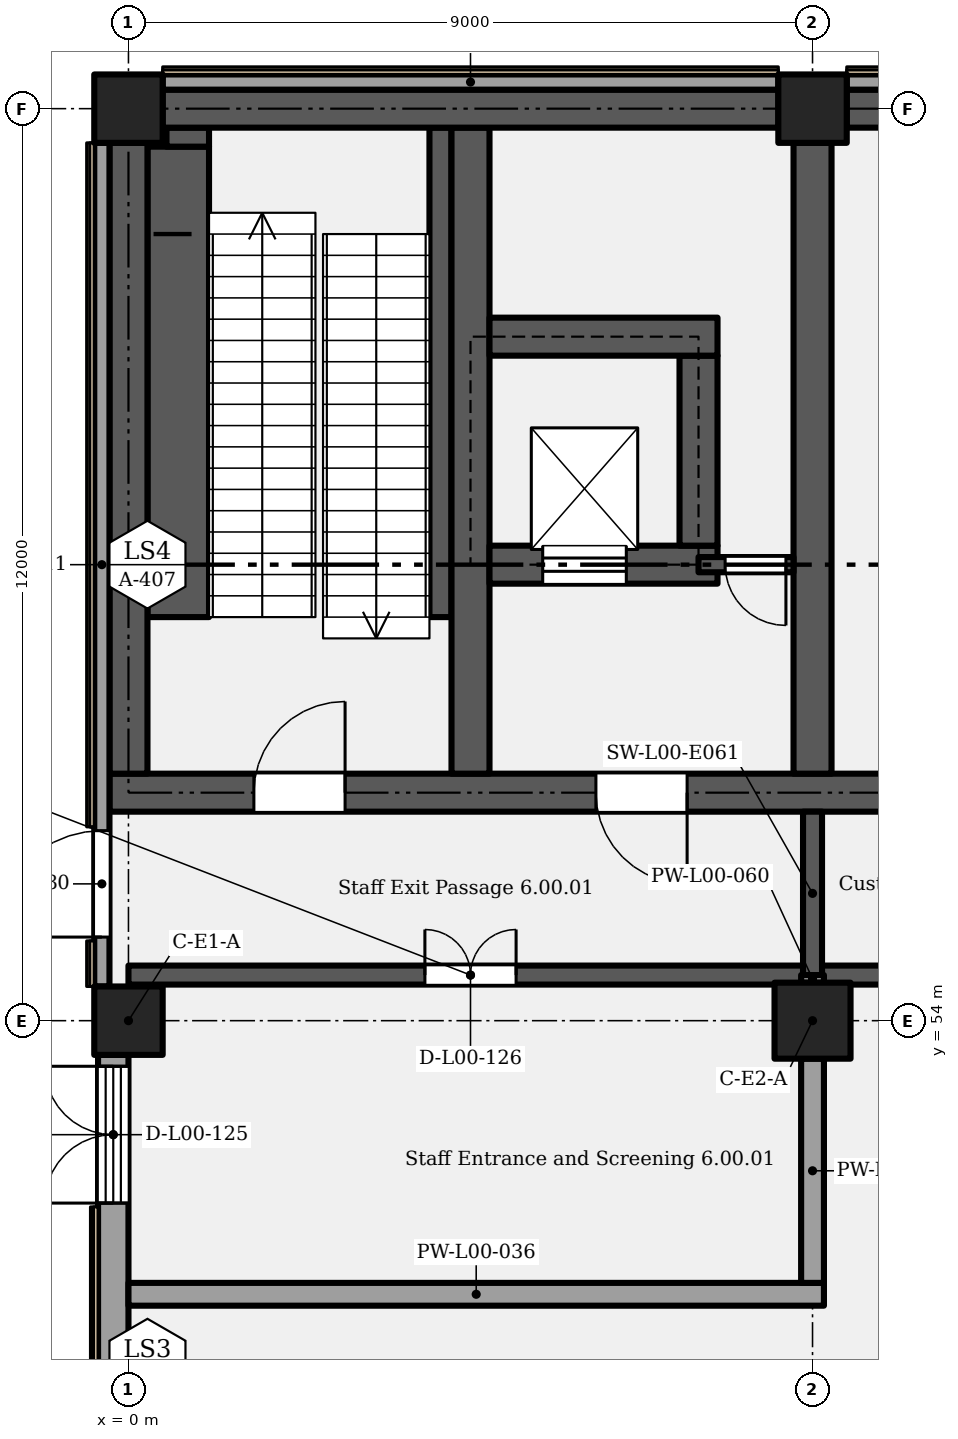
"""IFC4 building model, lengths in metres.
Left out: names, types, materials, properties, quantities, classifications, styles, units other than length and angle.
Written with IfcOpenShell. Run it as: python <this file> out.ifc"""

import sys

from ifc_helpers import new_model, si_unit, direction, frame, frame_2d, origin, origin_2d, place, context, subcontext, project, spatial, rectangle, extrude, element, fill, save


model = new_model("IFC4")
c1 = context("Model", 3, precision=1e-05, world=origin(), true_north=direction((0.0, 1.0)))
c2 = subcontext(c1, "Body", "Model", "MODEL_VIEW")
j1 = project(units=[si_unit("LENGTHUNIT", "METRE"), si_unit("PLANEANGLEUNIT", "RADIAN")], contexts=[c1])
p1 = place(None, origin())
s1 = spatial("IfcSite", under=j1, at=p1, CompositionType="ELEMENT")
p2 = place(p1, origin())
s2 = spatial("IfcBuilding", under=s1, at=p2, CompositionType="ELEMENT")
p3 = place(p2, origin())
s3 = spatial("IfcBuildingStorey", under=s2, at=p3, CompositionType="ELEMENT", Elevation=0.0)
p4 = place(p3, frame((0.0, 54.0, 0.0), z_axis=(0.0, 0.0, 1.0), x_axis=(1.0, 0.0, 0.0)))
e1 = element("IfcColumn", 1, at=p4, inside=s3, PredefinedType="COLUMN", context=c2, shape_type="SweptSolid", body=[
    extrude(rectangle(XDim=0.9, YDim=0.9, at=origin_2d()), origin(), (0.0, 0.0, 1.0), 6.6),
])
p5 = place(p3, frame((9.0, 54.0, 0.0), z_axis=(0.0, 0.0, 1.0), x_axis=(1.0, 0.0, 0.0)))
e2 = element("IfcColumn", 2, at=p5, inside=s3, PredefinedType="COLUMN", context=c2, shape_type="SweptSolid", body=[
    extrude(rectangle(XDim=1.0, YDim=1.0, at=origin_2d()), origin(), (0.0, 0.0, 1.0), 6.6),
])
for number, where, z_axis, x_axis in (
    (3, (0.0, 66.0, 0.0), (0.0, 0.0, 1.0), (1.0, 0.0, 0.0)),
    (4, (9.0, 66.0, 0.0), (0.0, 0.0, 1.0), (1.0, 0.0, 0.0)),
):
    element("IfcColumn", number, at=place(p3, frame(where, z_axis=z_axis, x_axis=x_axis)), inside=s3, PredefinedType="COLUMN", context=c2, shape_type="SweptSolid", body=[
        extrude(rectangle(XDim=0.9, YDim=0.9, at=origin_2d()), origin(), (0.0, 0.0, 1.0), 6.6),
    ])
p6 = place(p3, frame((-0.25, 57.0, 0.0), z_axis=(0.0, 0.0, 1.0), x_axis=(1.0, 0.0, 0.0)))
e5 = element("IfcWall", 5, at=p6, inside=s3, PredefinedType="SHEAR", context=c2, shape_type="SweptSolid", body=[
    extrude(rectangle(XDim=27.5, YDim=0.5, at=frame_2d((13.75, 0.0))), origin(), (0.0, 0.0, 1.0), 6.3),
])
p7 = place(p6, frame((1.9, 0.0, 0.0)))
e6 = element("IfcOpeningElement", 6, at=p7, cuts=e5, PredefinedType="OPENING", context=c2, shape_type="SweptSolid", body=[
    extrude(rectangle(XDim=1.2, YDim=2.1, at=frame_2d((0.6, 1.05))), frame((0.0, 0.26, 0.0), z_axis=(0.0, -1.0, 0.0), x_axis=(1.0, 0.0, 0.0)), (0.0, 0.0, 1.0), 0.52),
])
p8 = place(p6, frame((7.6, 0.0, 0.0), z_axis=(0.0, 0.0, 1.0), x_axis=(-1.0, 0.0, 0.0)))
e7 = element("IfcOpeningElement", 7, at=p8, cuts=e5, PredefinedType="OPENING", context=c2, shape_type="SweptSolid", body=[
    extrude(rectangle(XDim=1.2, YDim=2.1, at=frame_2d((0.6, 1.05))), frame((0.0, 0.26, 0.0), z_axis=(0.0, -1.0, 0.0), x_axis=(1.0, 0.0, 0.0)), (0.0, 0.0, 1.0), 0.52),
])
p9 = place(p6, frame((21.1, 0.0, 0.0), z_axis=(0.0, 0.0, 1.0), x_axis=(-1.0, 0.0, 0.0)))
e8 = element("IfcOpeningElement", 8, at=p9, cuts=e5, PredefinedType="OPENING", context=c2, shape_type="SweptSolid", body=[
    extrude(rectangle(XDim=1.2, YDim=2.1, at=frame_2d((0.6, 1.05))), frame((0.0, 0.26, 0.0), z_axis=(0.0, -1.0, 0.0), x_axis=(1.0, 0.0, 0.0)), (0.0, 0.0, 1.0), 0.52),
])
p10 = place(p6, frame((24.4, 0.0, 0.0)))
e9 = element("IfcOpeningElement", 9, at=p10, cuts=e5, PredefinedType="OPENING", context=c2, shape_type="SweptSolid", body=[
    extrude(rectangle(XDim=1.2, YDim=2.1, at=frame_2d((0.6, 1.05))), frame((0.0, 0.26, 0.0), z_axis=(0.0, -1.0, 0.0), x_axis=(1.0, 0.0, 0.0)), (0.0, 0.0, 1.0), 0.52),
])
p11 = place(p3, frame((0.0, 57.25, 0.0), z_axis=(0.0, 0.0, 1.0), x_axis=(0.0, 1.0, 0.0)))
e10 = element("IfcWall", 10, at=p11, inside=s3, PredefinedType="SHEAR", context=c2, shape_type="SweptSolid", body=[
    extrude(rectangle(XDim=8.3, YDim=0.5, at=frame_2d((4.15, 0.0))), origin(), (0.0, 0.0, 1.0), 6.3),
])
p12 = place(p3, frame((4.5, 57.25, 0.0), z_axis=(0.0, 0.0, 1.0), x_axis=(0.0, 1.0, 0.0)))
e11 = element("IfcWall", 11, at=p12, inside=s3, PredefinedType="SHEAR", context=c2, shape_type="SweptSolid", body=[
    extrude(rectangle(XDim=8.5, YDim=0.5, at=frame_2d((4.25, 0.0))), origin(), (0.0, 0.0, 1.0), 6.3),
])
p13 = place(p3, frame((9.0, 57.25, 0.0), z_axis=(0.0, 0.0, 1.0), x_axis=(0.0, 1.0, 0.0)))
e12 = element("IfcWall", 12, at=p13, inside=s3, PredefinedType="SHEAR", context=c2, shape_type="SweptSolid", body=[
    extrude(rectangle(XDim=8.3, YDim=0.5, at=frame_2d((4.15, 0.0))), origin(), (0.0, 0.0, 1.0), 6.3),
])
p14 = place(p3, frame((4.75, 60.0, 0.0), z_axis=(0.0, 0.0, 1.0), x_axis=(1.0, 0.0, 0.0)))
e13 = element("IfcWall", 13, at=p14, inside=s3, PredefinedType="SHEAR", context=c2, shape_type="SweptSolid", body=[
    extrude(rectangle(XDim=3.0, YDim=0.5, at=frame_2d((1.5, 0.0))), origin(), (0.0, 0.0, 1.0), 6.3),
])
p15 = place(p14, frame((0.7, 0.0, 0.0)))
e14 = element("IfcOpeningElement", 14, at=p15, cuts=e13, PredefinedType="OPENING", context=c2, shape_type="SweptSolid", body=[
    extrude(rectangle(XDim=1.1, YDim=2.1, at=frame_2d((0.55, 1.05))), frame((0.0, 0.26, 0.0), z_axis=(0.0, -1.0, 0.0), x_axis=(1.0, 0.0, 0.0)), (0.0, 0.0, 1.0), 0.52),
])
p16 = place(p3, frame((7.5, 60.25, 0.0), z_axis=(0.0, 0.0, 1.0), x_axis=(0.0, 1.0, 0.0)))
e15 = element("IfcWall", 15, at=p16, inside=s3, PredefinedType="SHEAR", context=c2, shape_type="SweptSolid", body=[
    extrude(rectangle(XDim=2.5, YDim=0.5, at=frame_2d((1.25, 0.0))), origin(), (0.0, 0.0, 1.0), 6.3),
])
p17 = place(p3, frame((4.75, 63.0, 0.0), z_axis=(0.0, 0.0, 1.0), x_axis=(1.0, 0.0, 0.0)))
e16 = element("IfcWall", 16, at=p17, inside=s3, PredefinedType="SHEAR", context=c2, shape_type="SweptSolid", body=[
    extrude(rectangle(XDim=3.0, YDim=0.5, at=frame_2d((1.5, 0.0))), origin(), (0.0, 0.0, 1.0), 6.3),
])
p18 = place(p3, frame((0.45, 66.0, 0.0), z_axis=(0.0, 0.0, 1.0), x_axis=(1.0, 0.0, 0.0)))
e17 = element("IfcWall", 17, at=p18, inside=s3, PredefinedType="SHEAR", context=c2, shape_type="SweptSolid", body=[
    extrude(rectangle(XDim=8.1, YDim=0.5, at=frame_2d((4.05, 0.0))), origin(), (0.0, 0.0, 1.0), 6.3),
])
p19 = place(p3, frame((9.45, 66.0, 0.0), z_axis=(0.0, 0.0, 1.0), x_axis=(1.0, 0.0, 0.0)))
e18 = element("IfcWall", 18, at=p19, inside=s3, PredefinedType="SHEAR", context=c2, shape_type="SweptSolid", body=[
    extrude(rectangle(XDim=8.1, YDim=0.5, at=frame_2d((4.05, 0.0))), origin(), (0.0, 0.0, 1.0), 6.3),
])
p20 = place(p19, frame((3.35, 0.0, 0.0)))
e19 = element("IfcOpeningElement", 19, at=p20, cuts=e18, PredefinedType="OPENING", context=c2, shape_type="SweptSolid", body=[
    extrude(rectangle(XDim=1.4, YDim=2.1, at=frame_2d((0.7, 1.05))), frame((0.0, 0.26, 0.0), z_axis=(0.0, -1.0, 0.0), x_axis=(1.0, 0.0, 0.0)), (0.0, 0.0, 1.0), 0.52),
])
p21 = place(p3, frame((0.45, 66.35, 0.0), z_axis=(0.0, 0.0, 1.0), x_axis=(1.0, 0.0, 0.0)))
e20 = element("IfcWall", 20, at=p21, inside=s3, PredefinedType="SOLIDWALL", context=c2, shape_type="SweptSolid", body=[
    extrude(rectangle(XDim=8.1, YDim=0.2, at=frame_2d((4.05, 0.0))), origin(), (0.0, 0.0, 1.0), 6.3),
])
p22 = place(p3, frame((9.45, 66.35, 0.0), z_axis=(0.0, 0.0, 1.0), x_axis=(1.0, 0.0, 0.0)))
e21 = element("IfcWall", 21, at=p22, inside=s3, PredefinedType="SOLIDWALL", context=c2, shape_type="SweptSolid", body=[
    extrude(rectangle(XDim=3.35, YDim=0.2, at=frame_2d((1.675, 0.0))), origin(), (0.0, 0.0, 1.0), 6.3),
])
p23 = place(p3, frame((-0.2, 37.95, 0.0), z_axis=(0.0, 0.0, 1.0), x_axis=(0.0, 1.0, 0.0)))
e22 = element("IfcWall", 22, at=p23, inside=s3, PredefinedType="SOLIDWALL", context=c2, shape_type="SweptSolid", body=[
    extrude(rectangle(XDim=15.6, YDim=0.4, at=frame_2d((7.8, 0.0))), origin(), (0.0, 0.0, 1.0), 6.3),
])
p24 = place(p23, frame((1.8, 0.0, 0.0)))
e23 = element("IfcOpeningElement", 23, at=p24, cuts=e22, PredefinedType="OPENING", context=c2, shape_type="SweptSolid", body=[
    extrude(rectangle(XDim=4.5, YDim=2.1, at=frame_2d((2.25, 1.05))), frame((0.0, 0.21, 0.0), z_axis=(0.0, -1.0, 0.0), x_axis=(1.0, 0.0, 0.0)), (0.0, 0.0, 1.0), 0.42),
])
p25 = place(p23, frame((6.8, 0.0, 0.0)))
e24 = element("IfcOpeningElement", 24, at=p25, cuts=e22, PredefinedType="OPENING", context=c2, shape_type="SweptSolid", body=[
    extrude(rectangle(XDim=4.5, YDim=2.1, at=frame_2d((2.25, 1.05))), frame((0.0, 0.21, 0.0), z_axis=(0.0, -1.0, 0.0), x_axis=(1.0, 0.0, 0.0)), (0.0, 0.0, 1.0), 0.42),
])
p26 = place(p23, frame((13.65, 0.0, 0.0)))
e25 = element("IfcOpeningElement", 25, at=p26, cuts=e22, PredefinedType="OPENING", context=c2, shape_type="SweptSolid", body=[
    extrude(rectangle(XDim=1.8, YDim=2.1, at=frame_2d((0.9, 1.05))), frame((0.0, 0.21, 0.0), z_axis=(0.0, -1.0, 0.0), x_axis=(1.0, 0.0, 0.0)), (0.0, 0.0, 1.0), 0.42),
])
p27 = place(p23, frame((13.65, 0.0, 2.25)))
e26 = element("IfcOpeningElement", 26, at=p27, cuts=e22, PredefinedType="OPENING", context=c2, shape_type="SweptSolid", body=[
    extrude(rectangle(XDim=1.8, YDim=0.8, at=frame_2d((0.9, 0.4))), frame((0.0, 0.21, 0.0), z_axis=(0.0, -1.0, 0.0), x_axis=(1.0, 0.0, 0.0)), (0.0, 0.0, 1.0), 0.42),
])
p28 = place(p3, frame((-0.35, 54.45, 0.0), z_axis=(0.0, 0.0, 1.0), x_axis=(0.0, 1.0, 0.0)))
e27 = element("IfcWall", 27, at=p28, inside=s3, PredefinedType="SOLIDWALL", context=c2, shape_type="SweptSolid", body=[
    extrude(rectangle(XDim=11.1, YDim=0.2, at=frame_2d((5.55, 0.0))), origin(), (0.0, 0.0, 1.0), 6.3),
])
p29 = place(p28, frame((0.65, 0.0, 0.0)))
e28 = element("IfcOpeningElement", 28, at=p29, cuts=e27, PredefinedType="OPENING", context=c2, shape_type="SweptSolid", body=[
    extrude(rectangle(XDim=1.4, YDim=2.1, at=frame_2d((0.7, 1.05))), frame((0.0, 0.11, 0.0), z_axis=(0.0, -1.0, 0.0), x_axis=(1.0, 0.0, 0.0)), (0.0, 0.0, 1.0), 0.22),
])
p30 = place(p3, frame((0.0, 50.4, 0.0), z_axis=(0.0, 0.0, 1.0), x_axis=(1.0, 0.0, 0.0)))
e29 = element("IfcWall", 29, at=p30, inside=s3, PredefinedType="PARTITIONING", context=c2, shape_type="SweptSolid", body=[
    extrude(rectangle(XDim=9.15, YDim=0.3, at=frame_2d((4.575, 0.0))), origin(), (0.0, 0.0, 1.0), 6.3),
])
p31 = place(p3, frame((0.0, 54.6, 0.0), z_axis=(0.0, 0.0, 1.0), x_axis=(1.0, 0.0, 0.0)))
e30 = element("IfcWall", 30, at=p31, inside=s3, PredefinedType="SHEAR", context=c2, shape_type="SweptSolid", body=[
    extrude(rectangle(XDim=9.0, YDim=0.25, at=frame_2d((4.5, 0.0))), origin(), (0.0, 0.0, 1.0), 6.3),
])
p32 = place(p31, frame((3.9, 0.0, 0.0)))
e31 = element("IfcOpeningElement", 31, at=p32, cuts=e30, PredefinedType="OPENING", context=c2, shape_type="SweptSolid", body=[
    extrude(rectangle(XDim=1.2, YDim=2.1, at=frame_2d((0.6, 1.05))), frame((0.0, 0.135, 0.0), z_axis=(0.0, -1.0, 0.0), x_axis=(1.0, 0.0, 0.0)), (0.0, 0.0, 1.0), 0.27),
])
p33 = place(p3, frame((9.0, 54.6, 0.0), z_axis=(0.0, 0.0, 1.0), x_axis=(1.0, 0.0, 0.0)))
e32 = element("IfcWall", 32, at=p33, inside=s3, PredefinedType="SHEAR", context=c2, shape_type="SweptSolid", body=[
    extrude(rectangle(XDim=9.125, YDim=0.25, at=frame_2d((4.562, 0.0))), origin(), (0.0, 0.0, 1.0), 6.3),
])
p34 = place(p33, frame((3.9, 0.0, 0.0)))
e33 = element("IfcOpeningElement", 33, at=p34, cuts=e32, PredefinedType="OPENING", context=c2, shape_type="SweptSolid", body=[
    extrude(rectangle(XDim=1.2, YDim=2.1, at=frame_2d((0.6, 1.05))), frame((0.0, 0.135, 0.0), z_axis=(0.0, -1.0, 0.0), x_axis=(1.0, 0.0, 0.0)), (0.0, 0.0, 1.0), 0.27),
])
p35 = place(p3, frame((7.5, 60.0, 0.0), z_axis=(0.0, 0.0, 1.0), x_axis=(1.0, 0.0, 0.0)))
e34 = element("IfcWall", 34, at=p35, inside=s3, PredefinedType="SHEAR", context=c2, shape_type="SweptSolid", body=[
    extrude(rectangle(XDim=1.25, YDim=0.2, at=frame_2d((0.625, 0.0))), origin(), (0.0, 0.0, 1.0), 6.3),
])
p36 = place(p35, frame((1.15, 0.0, 0.0), z_axis=(0.0, 0.0, 1.0), x_axis=(-1.0, 0.0, 0.0)))
e35 = element("IfcOpeningElement", 35, at=p36, cuts=e34, PredefinedType="OPENING", context=c2, shape_type="SweptSolid", body=[
    extrude(rectangle(XDim=0.8, YDim=2.0, at=frame_2d((0.4, 1.0))), frame((0.0, 0.11, 0.0), z_axis=(0.0, -1.0, 0.0), x_axis=(1.0, 0.0, 0.0)), (0.0, 0.0, 1.0), 0.22),
])
p37 = place(p3, frame((9.0, 50.55, 0.0), z_axis=(0.0, 0.0, 1.0), x_axis=(0.0, 1.0, 0.0)))
e36 = element("IfcWall", 36, at=p37, inside=s3, PredefinedType="PARTITIONING", context=c2, shape_type="SweptSolid", body=[
    extrude(rectangle(XDim=2.95, YDim=0.3, at=frame_2d((1.475, 0.0))), origin(), (0.0, 0.0, 1.0), 5.35),
])
p38 = place(p3, frame((9.0, 54.5, 0.0), z_axis=(0.0, 0.0, 1.0), x_axis=(0.0, 1.0, 0.0)))
e37 = element("IfcWall", 37, at=p38, inside=s3, PredefinedType="PARTITIONING", context=c2, shape_type="SweptSolid", body=[
    extrude(rectangle(XDim=0.1, YDim=0.3, at=frame_2d((0.05, 0.0))), origin(), (0.0, 0.0, 1.0), 6.3),
])
p39 = place(p3, frame((9.0, 54.6, 0.0), z_axis=(0.0, 0.0, 1.0), x_axis=(0.0, 1.0, 0.0)))
e38 = element("IfcWall", 38, at=p39, inside=s3, PredefinedType="SHEAR", context=c2, shape_type="SweptSolid", body=[
    extrude(rectangle(XDim=2.15, YDim=0.25, at=frame_2d((1.075, 0.0))), origin(), (0.0, 0.0, 1.0), 6.3),
])
p40 = place(p3, frame((0.655, 59.31, 0.0), z_axis=(0.0, 0.0, 1.0), x_axis=(0.0, 1.0, 0.0)))
e39 = element("IfcWall", 39, at=p40, inside=s3, PredefinedType="SHEAR", context=c2, shape_type="SweptSolid", body=[
    extrude(rectangle(XDim=6.19, YDim=0.81, at=frame_2d((3.095, 0.0))), origin(), (0.0, 0.0, 1.0), 3.1),
])
p41 = place(p3, frame((0.78, 65.5, 0.0), z_axis=(0.0, 0.0, 1.0), x_axis=(0.0, 1.0, 0.0)))
e40 = element("IfcWall", 40, at=p41, inside=s3, PredefinedType="SHEAR", context=c2, shape_type="SweptSolid", body=[
    extrude(rectangle(XDim=0.25, YDim=0.56, at=frame_2d((0.125, 0.0))), origin(), (0.0, 0.0, 1.0), 3.1),
])
p42 = place(p3, frame((4.105, 59.31, 0.0), z_axis=(0.0, 0.0, 1.0), x_axis=(0.0, 1.0, 0.0)))
e41 = element("IfcWall", 41, at=p42, inside=s3, PredefinedType="SHEAR", context=c2, shape_type="SweptSolid", body=[
    extrude(rectangle(XDim=6.44, YDim=0.29, at=frame_2d((3.22, 0.0))), origin(), (0.0, 0.0, 1.0), 3.1),
])
p43 = place(p26, origin())
e42 = element("IfcDoor", 42, at=p43, inside=s3, OperationType="DOUBLE_DOOR_SINGLE_SWING", PredefinedType="DOOR", context=c2, shape_type="SweptSolid", body=[
    extrude(rectangle(XDim=1.8, YDim=2.1, at=frame_2d((0.9, 1.05))), frame((0.0, 0.025, 0.0), z_axis=(0.0, -1.0, 0.0), x_axis=(1.0, 0.0, 0.0)), (0.0, 0.0, 1.0), 0.05),
])
fill(e25, e42)
p44 = place(p27, origin())
e43 = element("IfcWindow", 43, at=p44, inside=s3, PartitioningType="SINGLE_PANEL", PredefinedType="WINDOW", context=c2, shape_type="SweptSolid", body=[
    extrude(rectangle(XDim=1.8, YDim=0.8, at=frame_2d((0.9, 0.4))), frame((0.0, 0.03, 0.0), z_axis=(0.0, -1.0, 0.0), x_axis=(1.0, 0.0, 0.0)), (0.0, 0.0, 1.0), 0.06),
])
fill(e26, e43)
p45 = place(p29, origin())
e44 = element("IfcDoor", 44, at=p45, inside=s3, OperationType="SINGLE_SWING_RIGHT", PredefinedType="DOOR", context=c2, shape_type="SweptSolid", body=[
    extrude(rectangle(XDim=1.4, YDim=2.1, at=frame_2d((0.7, 1.05))), frame((0.0, 0.025, 0.0), z_axis=(0.0, -1.0, 0.0), x_axis=(1.0, 0.0, 0.0)), (0.0, 0.0, 1.0), 0.05),
])
fill(e28, e44)
p46 = place(p7, origin())
e45 = element("IfcDoor", 45, at=p46, inside=s3, OperationType="SINGLE_SWING_RIGHT", PredefinedType="DOOR", context=c2, shape_type="SweptSolid", body=[
    extrude(rectangle(XDim=1.2, YDim=2.1, at=frame_2d((0.6, 1.05))), frame((0.0, 0.025, 0.0), z_axis=(0.0, -1.0, 0.0), x_axis=(1.0, 0.0, 0.0)), (0.0, 0.0, 1.0), 0.05),
])
fill(e6, e45)
p47 = place(p8, origin())
e46 = element("IfcDoor", 46, at=p47, inside=s3, OperationType="SINGLE_SWING_LEFT", PredefinedType="DOOR", context=c2, shape_type="SweptSolid", body=[
    extrude(rectangle(XDim=1.2, YDim=2.1, at=frame_2d((0.6, 1.05))), frame((0.0, 0.025, 0.0), z_axis=(0.0, -1.0, 0.0), x_axis=(1.0, 0.0, 0.0)), (0.0, 0.0, 1.0), 0.05),
])
fill(e7, e46)
p48 = place(p15, origin())
e47 = element("IfcDoor", 47, at=p48, inside=s3, OperationType="SLIDING_TO_LEFT", PredefinedType="DOOR", context=c2, shape_type="SweptSolid", body=[
    extrude(rectangle(XDim=1.1, YDim=2.1, at=frame_2d((0.55, 1.05))), frame((0.0, 0.025, 0.0), z_axis=(0.0, -1.0, 0.0), x_axis=(1.0, 0.0, 0.0)), (0.0, 0.0, 1.0), 0.05),
])
fill(e14, e47)
p49 = place(p36, origin())
e48 = element("IfcDoor", 48, at=p49, inside=s3, OperationType="SINGLE_SWING_LEFT", PredefinedType="DOOR", context=c2, shape_type="SweptSolid", body=[
    extrude(rectangle(XDim=0.8, YDim=2.0, at=frame_2d((0.4, 1.0))), frame((0.0, 0.025, 0.0), z_axis=(0.0, -1.0, 0.0), x_axis=(1.0, 0.0, 0.0)), (0.0, 0.0, 1.0), 0.05),
])
fill(e35, e48)
p50 = place(p32, origin())
e49 = element("IfcDoor", 49, at=p50, inside=s3, OperationType="DOUBLE_DOOR_SINGLE_SWING", PredefinedType="DOOR", context=c2, shape_type="SweptSolid", body=[
    extrude(rectangle(XDim=1.2, YDim=2.1, at=frame_2d((0.6, 1.05))), frame((0.0, 0.025, 0.0), z_axis=(0.0, -1.0, 0.0), x_axis=(1.0, 0.0, 0.0)), (0.0, 0.0, 1.0), 0.05),
])
fill(e31, e49)
save(model, sys.argv[1])
